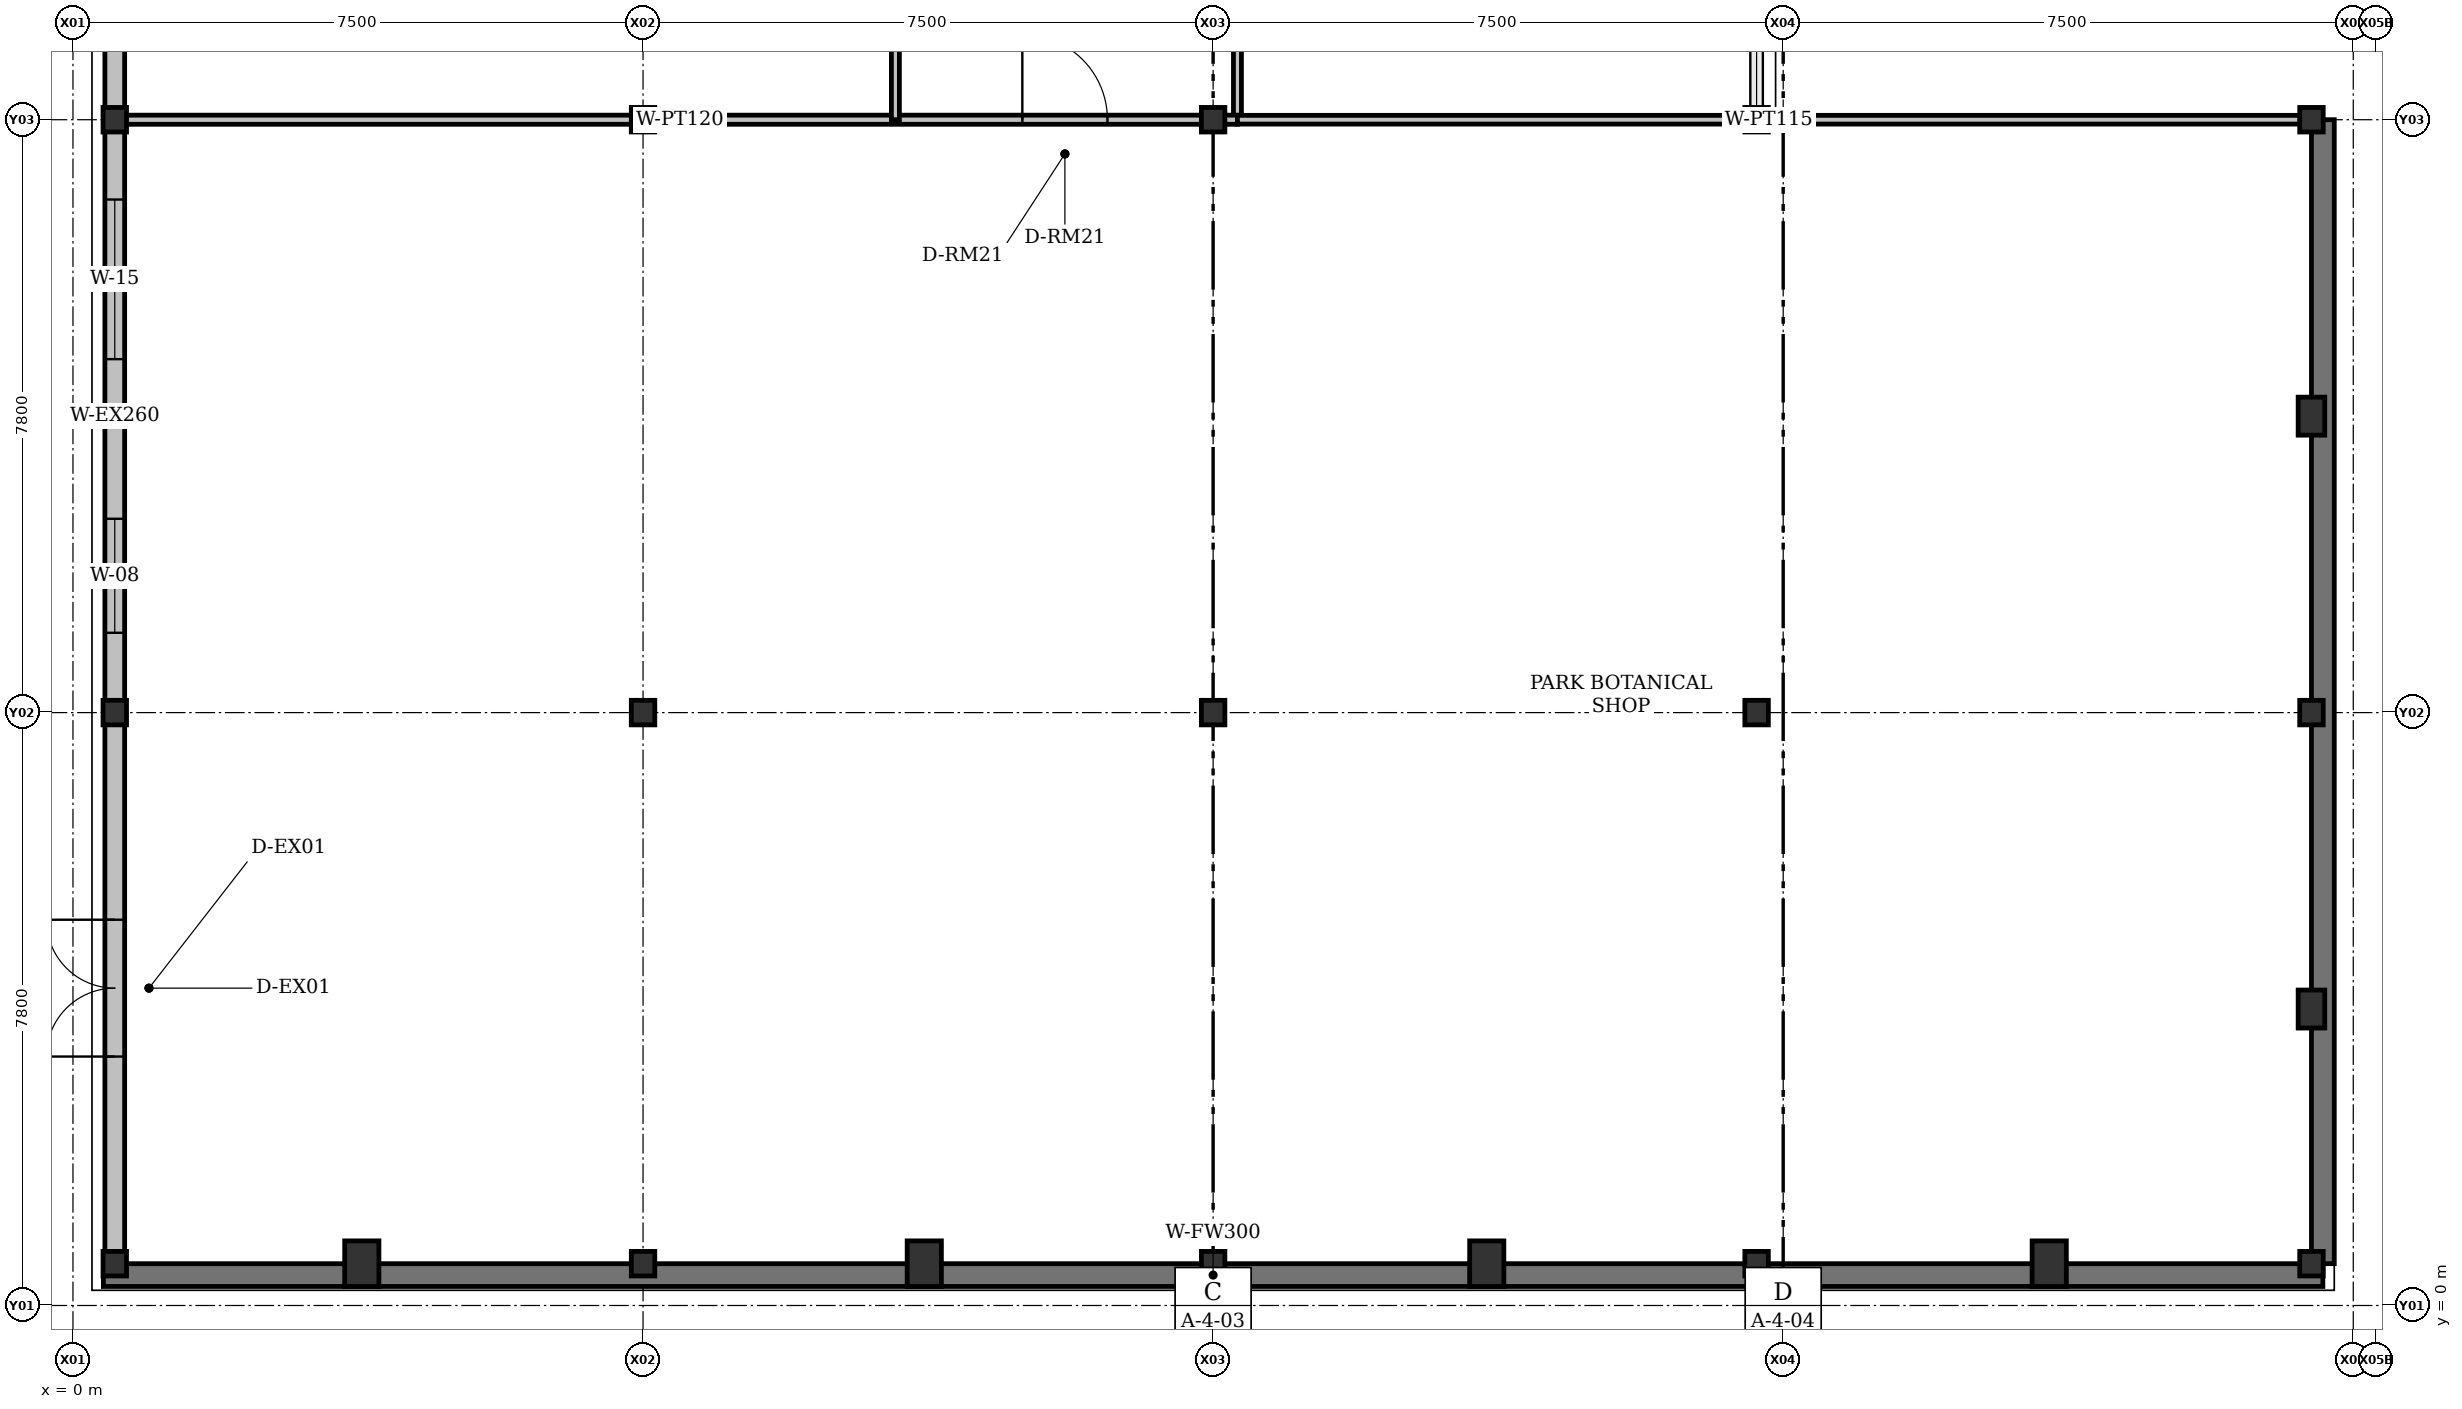
"""IFC4 building model, lengths in metres.
Left out: names, types, materials, properties, quantities, classifications, styles, units other than length and angle.
Written with IfcOpenShell. Run it as: python <this file> out.ifc"""

import sys

from ifc_helpers import new_model, si_unit, direction, frame, frame_2d, origin, origin_2d, place, context, subcontext, project, spatial, rectangle, i_section, extrude, element, fill, save


model = new_model("IFC4")
c1 = context("Model", 3, precision=1e-05, world=origin(), true_north=direction((0.0, 1.0)))
c2 = subcontext(c1, "Body", "Model", "MODEL_VIEW")
j1 = project(units=[si_unit("LENGTHUNIT", "METRE"), si_unit("PLANEANGLEUNIT", "RADIAN")], contexts=[c1])
p1 = place(None, origin())
s1 = spatial("IfcSite", under=j1, at=p1, CompositionType="ELEMENT")
p2 = place(p1, origin())
s2 = spatial("IfcBuilding", under=s1, at=p2, CompositionType="ELEMENT")
p3 = place(p2, origin())
s3 = spatial("IfcBuildingStorey", under=s2, at=p3, CompositionType="ELEMENT", Elevation=0.0)
for number, where, z_axis, x_axis in (
    (1, (0.55, 0.55, 0.0), (0.0, 0.0, 1.0), (1.0, 0.0, 0.0)),
    (2, (0.55, 7.8, 0.0), (0.0, 0.0, 1.0), (1.0, 0.0, 0.0)),
    (3, (0.55, 15.6, 0.0), (0.0, 0.0, 1.0), (1.0, 0.0, 0.0)),
    (4, (7.5, 0.55, 0.0), (0.0, 0.0, 1.0), (1.0, 0.0, 0.0)),
    (5, (7.5, 7.8, 0.0), (0.0, 0.0, 1.0), (1.0, 0.0, 0.0)),
    (6, (7.5, 15.6, 0.0), (0.0, 0.0, 1.0), (1.0, 0.0, 0.0)),
    (7, (15.0, 0.55, 0.0), (0.0, 0.0, 1.0), (1.0, 0.0, 0.0)),
    (8, (15.0, 7.8, 0.0), (0.0, 0.0, 1.0), (1.0, 0.0, 0.0)),
    (9, (15.0, 15.6, 0.0), (0.0, 0.0, 1.0), (1.0, 0.0, 0.0)),
    (10, (22.15, 0.55, 0.0), (0.0, 0.0, 1.0), (1.0, 0.0, 0.0)),
    (11, (22.15, 7.8, 0.0), (0.0, 0.0, 1.0), (1.0, 0.0, 0.0)),
    (12, (22.15, 15.6, 0.0), (0.0, 0.0, 1.0), (1.0, 0.0, 0.0)),
    (13, (29.45, 0.55, 0.0), (0.0, 0.0, 1.0), (1.0, 0.0, 0.0)),
    (14, (29.45, 7.8, 0.0), (0.0, 0.0, 1.0), (1.0, 0.0, 0.0)),
    (15, (29.45, 15.6, 0.0), (0.0, 0.0, 1.0), (1.0, 0.0, 0.0)),
):
    element("IfcColumn", number, at=place(p3, frame(where, z_axis=z_axis, x_axis=x_axis)), inside=s3, PredefinedType="COLUMN", context=c2, shape_type="SweptSolid", body=[
        extrude(i_section(OverallWidth=0.309, OverallDepth=0.323, WebThickness=0.014, FlangeThickness=0.023, FilletRadius=0.015, at=origin_2d()), origin(), (0.0, 0.0, 1.0), 5.4),
    ])
for number, where, z_axis, x_axis in (
    (16, (3.8, 0.55, 0.0), (0.0, 0.0, 1.0), (1.0, 0.0, 0.0)),
    (17, (11.2, 0.55, 0.0), (0.0, 0.0, 1.0), (1.0, 0.0, 0.0)),
    (18, (18.6, 0.55, 0.0), (0.0, 0.0, 1.0), (1.0, 0.0, 0.0)),
    (19, (26.0, 0.55, 0.0), (0.0, 0.0, 1.0), (1.0, 0.0, 0.0)),
):
    element("IfcColumn", number, at=place(p3, frame(where, z_axis=z_axis, x_axis=x_axis)), inside=s3, PredefinedType="PILASTER", context=c2, shape_type="SweptSolid", body=[
        extrude(rectangle(XDim=0.45, YDim=0.6, at=origin_2d()), origin(), (0.0, 0.0, 1.0), 5.4),
    ])
for number, where, z_axis, x_axis in (
    (20, (29.45, 3.9, 0.0), (0.0, 0.0, 1.0), (1.0, 0.0, 0.0)),
    (21, (29.45, 11.7, 0.0), (0.0, 0.0, 1.0), (1.0, 0.0, 0.0)),
):
    element("IfcColumn", number, at=place(p3, frame(where, z_axis=z_axis, x_axis=x_axis)), inside=s3, PredefinedType="PILASTER", context=c2, shape_type="SweptSolid", body=[
        extrude(rectangle(XDim=0.35, YDim=0.5, at=origin_2d()), origin(), (0.0, 0.0, 1.0), 5.4),
    ])
p4 = place(p3, frame((29.6, 0.4, 0.0), z_axis=(0.0, 0.0, 1.0), x_axis=(-1.0, 0.0, 0.0)))
e22 = element("IfcWall", 22, at=p4, inside=s3, PredefinedType="SOLIDWALL", context=c2, shape_type="SweptSolid", body=[
    extrude(rectangle(XDim=29.2, YDim=0.3, at=frame_2d((14.6, 0.0))), origin(), (0.0, 0.0, 1.0), 5.21),
])
p5 = place(p3, frame((29.6, 15.6, 0.0), z_axis=(0.0, 0.0, 1.0), x_axis=(0.0, -1.0, 0.0)))
e23 = element("IfcWall", 23, at=p5, inside=s3, PredefinedType="SOLIDWALL", context=c2, shape_type="SweptSolid", body=[
    extrude(rectangle(XDim=15.05, YDim=0.3, at=frame_2d((7.525, 0.0))), origin(), (0.0, 0.0, 1.0), 5.21),
])
p6 = place(p3, frame((0.55, 0.55, 0.0), z_axis=(0.0, 0.0, 1.0), x_axis=(0.0, 1.0, 0.0)))
e24 = element("IfcWall", 24, at=p6, inside=s3, PredefinedType="SOLIDWALL", context=c2, shape_type="SweptSolid", body=[
    extrude(rectangle(XDim=7.25, YDim=0.26, at=frame_2d((3.625, 0.0))), origin(), (0.0, 0.0, 1.0), 4.737),
])
p7 = place(p6, frame((2.725, 0.0, 0.0)))
e25 = element("IfcOpeningElement", 25, at=p7, cuts=e24, PredefinedType="OPENING", context=c2, shape_type="SweptSolid", body=[
    extrude(rectangle(XDim=1.8, YDim=2.4, at=frame_2d((0.9, 1.2))), frame((0.0, 0.13, 0.0), z_axis=(0.0, -1.0, 0.0), x_axis=(1.0, 0.0, 0.0)), (0.0, 0.0, 1.0), 0.26),
])
p8 = place(p3, frame((0.55, 7.8, 0.0), z_axis=(0.0, 0.0, 1.0), x_axis=(0.0, 1.0, 0.0)))
e26 = element("IfcWall", 26, at=p8, inside=s3, PredefinedType="SOLIDWALL", context=c2, shape_type="SweptSolid", body=[
    extrude(rectangle(XDim=7.8, YDim=0.26, at=frame_2d((3.9, 0.0))), origin(), (0.0, 0.0, 1.0), 4.737),
])
p9 = place(p8, frame((1.05, 0.0, 0.92)))
e27 = element("IfcOpeningElement", 27, at=p9, cuts=e26, PredefinedType="OPENING", context=c2, shape_type="SweptSolid", body=[
    extrude(rectangle(XDim=1.5, YDim=1.55, at=frame_2d((0.75, 0.775))), frame((0.0, 0.13, 0.0), z_axis=(0.0, -1.0, 0.0), x_axis=(1.0, 0.0, 0.0)), (0.0, 0.0, 1.0), 0.26),
])
p10 = place(p8, frame((4.65, 0.0, 0.92)))
e28 = element("IfcOpeningElement", 28, at=p10, cuts=e26, PredefinedType="OPENING", context=c2, shape_type="SweptSolid", body=[
    extrude(rectangle(XDim=2.1, YDim=1.7, at=frame_2d((1.05, 0.85))), frame((0.0, 0.13, 0.0), z_axis=(0.0, -1.0, 0.0), x_axis=(1.0, 0.0, 0.0)), (0.0, 0.0, 1.0), 0.26),
])
p11 = place(p3, frame((0.55, 15.6, 0.0), z_axis=(0.0, 0.0, 1.0), x_axis=(0.0, 1.0, 0.0)))
e29 = element("IfcWall", 29, at=p11, inside=s3, PredefinedType="SOLIDWALL", context=c2, shape_type="SweptSolid", body=[
    extrude(rectangle(XDim=7.8, YDim=0.26, at=frame_2d((3.9, 0.0))), origin(), (0.0, 0.0, 1.0), 4.737),
])
p12 = place(p11, frame((1.05, 0.0, 0.92)))
e30 = element("IfcOpeningElement", 30, at=p12, cuts=e29, PredefinedType="OPENING", context=c2, shape_type="SweptSolid", body=[
    extrude(rectangle(XDim=1.8, YDim=1.55, at=frame_2d((0.9, 0.775))), frame((0.0, 0.13, 0.0), z_axis=(0.0, -1.0, 0.0), x_axis=(1.0, 0.0, 0.0)), (0.0, 0.0, 1.0), 0.26),
])
p13 = place(p11, frame((4.35, 0.0, 0.92)))
e31 = element("IfcOpeningElement", 31, at=p13, cuts=e29, PredefinedType="OPENING", context=c2, shape_type="SweptSolid", body=[
    extrude(rectangle(XDim=2.4, YDim=1.7, at=frame_2d((1.2, 0.85))), frame((0.0, 0.13, 0.0), z_axis=(0.0, -1.0, 0.0), x_axis=(1.0, 0.0, 0.0)), (0.0, 0.0, 1.0), 0.26),
])
p14 = place(p3, frame((15.32, 15.6, 0.0), z_axis=(0.0, 0.0, 1.0), x_axis=(0.0, 1.0, 0.0)))
e32 = element("IfcWall", 32, at=p14, inside=s3, PredefinedType="PARTITIONING", context=c2, shape_type="SweptSolid", body=[
    extrude(rectangle(XDim=1.78, YDim=0.105, at=frame_2d((0.89, 0.0))), origin(), (0.0, 0.0, 1.0), 4.661),
])
p15 = place(p3, frame((0.65, 15.6, 0.0), z_axis=(0.0, 0.0, 1.0), x_axis=(1.0, 0.0, 0.0)))
e33 = element("IfcWall", 33, at=p15, inside=s3, PredefinedType="PARTITIONING", context=c2, shape_type="SweptSolid", body=[
    extrude(rectangle(XDim=14.67, YDim=0.12, at=frame_2d((7.335, 0.0))), origin(), (0.0, 0.0, 1.0), 4.661),
])
p16 = place(p15, frame((11.84, 0.0, 0.0)))
e34 = element("IfcOpeningElement", 34, at=p16, cuts=e33, PredefinedType="OPENING", context=c2, shape_type="SweptSolid", body=[
    extrude(rectangle(XDim=1.12, YDim=2.25, at=frame_2d((0.56, 1.125))), frame((0.0, 0.06, 0.0), z_axis=(0.0, -1.0, 0.0), x_axis=(1.0, 0.0, 0.0)), (0.0, 0.0, 1.0), 0.12),
])
p17 = place(p3, frame((29.301, 15.6, 0.0), z_axis=(0.0, 0.0, 1.0), x_axis=(-1.0, 0.0, 0.0)))
e35 = element("IfcWall", 35, at=p17, inside=s3, PredefinedType="PARTITIONING", context=c2, shape_type="SweptSolid", body=[
    extrude(rectangle(XDim=13.98, YDim=0.115, at=frame_2d((6.99, 0.0))), origin(), (0.0, 0.0, 1.0), 4.661),
])
p18 = place(p3, frame((10.82, 15.6, 0.0), z_axis=(0.0, 0.0, 1.0), x_axis=(0.0, 1.0, 0.0)))
e36 = element("IfcWall", 36, at=p18, inside=s3, PredefinedType="PARTITIONING", context=c2, shape_type="SweptSolid", body=[
    extrude(rectangle(XDim=15.6, YDim=0.105, at=frame_2d((7.8, 0.0))), origin(), (0.0, 0.0, 1.0), 4.661),
])
p19 = place(p18, frame((7.21, 0.0, 0.0)))
e37 = element("IfcOpeningElement", 37, at=p19, cuts=e36, PredefinedType="OPENING", context=c2, shape_type="SweptSolid", body=[
    extrude(rectangle(XDim=1.18, YDim=2.25, at=frame_2d((0.59, 1.125))), frame((0.0, 0.052, 0.0), z_axis=(0.0, -1.0, 0.0), x_axis=(1.0, 0.0, 0.0)), (0.0, 0.0, 1.0), 0.105),
])
p20 = place(p18, frame((9.24, 0.0, 0.92)))
e38 = element("IfcOpeningElement", 38, at=p20, cuts=e36, PredefinedType="OPENING", context=c2, shape_type="SweptSolid", body=[
    extrude(rectangle(XDim=0.85, YDim=1.1, at=frame_2d((0.425, 0.55))), frame((0.0, 0.052, 0.0), z_axis=(0.0, -1.0, 0.0), x_axis=(1.0, 0.0, 0.0)), (0.0, 0.0, 1.0), 0.105),
])
p21 = place(p7, origin())
e39 = element("IfcDoor", 39, at=p21, inside=s3, OperationType="DOUBLE_DOOR_SINGLE_SWING", PredefinedType="DOOR", context=c2, shape_type="SweptSolid", body=[
    extrude(rectangle(XDim=1.8, YDim=2.4, at=frame_2d((0.9, 1.2))), frame((0.0, 0.025, 0.0), z_axis=(0.0, -1.0, 0.0), x_axis=(1.0, 0.0, 0.0)), (0.0, 0.0, 1.0), 0.05),
])
fill(e25, e39)
p22 = place(p9, origin())
e40 = element("IfcWindow", 40, at=p22, inside=s3, PartitioningType="SINGLE_PANEL", PredefinedType="WINDOW", context=c2, shape_type="SweptSolid", body=[
    extrude(rectangle(XDim=1.5, YDim=1.55, at=frame_2d((0.75, 0.775))), frame((0.0, 0.03, 0.0), z_axis=(0.0, -1.0, 0.0), x_axis=(1.0, 0.0, 0.0)), (0.0, 0.0, 1.0), 0.06),
])
fill(e27, e40)
p23 = place(p10, origin())
e41 = element("IfcWindow", 41, at=p23, inside=s3, PartitioningType="DOUBLE_PANEL_VERTICAL", PredefinedType="WINDOW", context=c2, shape_type="SweptSolid", body=[
    extrude(rectangle(XDim=2.1, YDim=1.7, at=frame_2d((1.05, 0.85))), frame((0.0, 0.03, 0.0), z_axis=(0.0, -1.0, 0.0), x_axis=(1.0, 0.0, 0.0)), (0.0, 0.0, 1.0), 0.06),
])
fill(e28, e41)
p24 = place(p16, origin())
e42 = element("IfcDoor", 42, at=p24, inside=s3, OperationType="SINGLE_SWING_LEFT", PredefinedType="DOOR", context=c2, shape_type="SweptSolid", body=[
    extrude(rectangle(XDim=1.12, YDim=2.25, at=frame_2d((0.56, 1.125))), frame((0.0, 0.025, 0.0), z_axis=(0.0, -1.0, 0.0), x_axis=(1.0, 0.0, 0.0)), (0.0, 0.0, 1.0), 0.05),
])
fill(e34, e42)
save(model, sys.argv[1])
